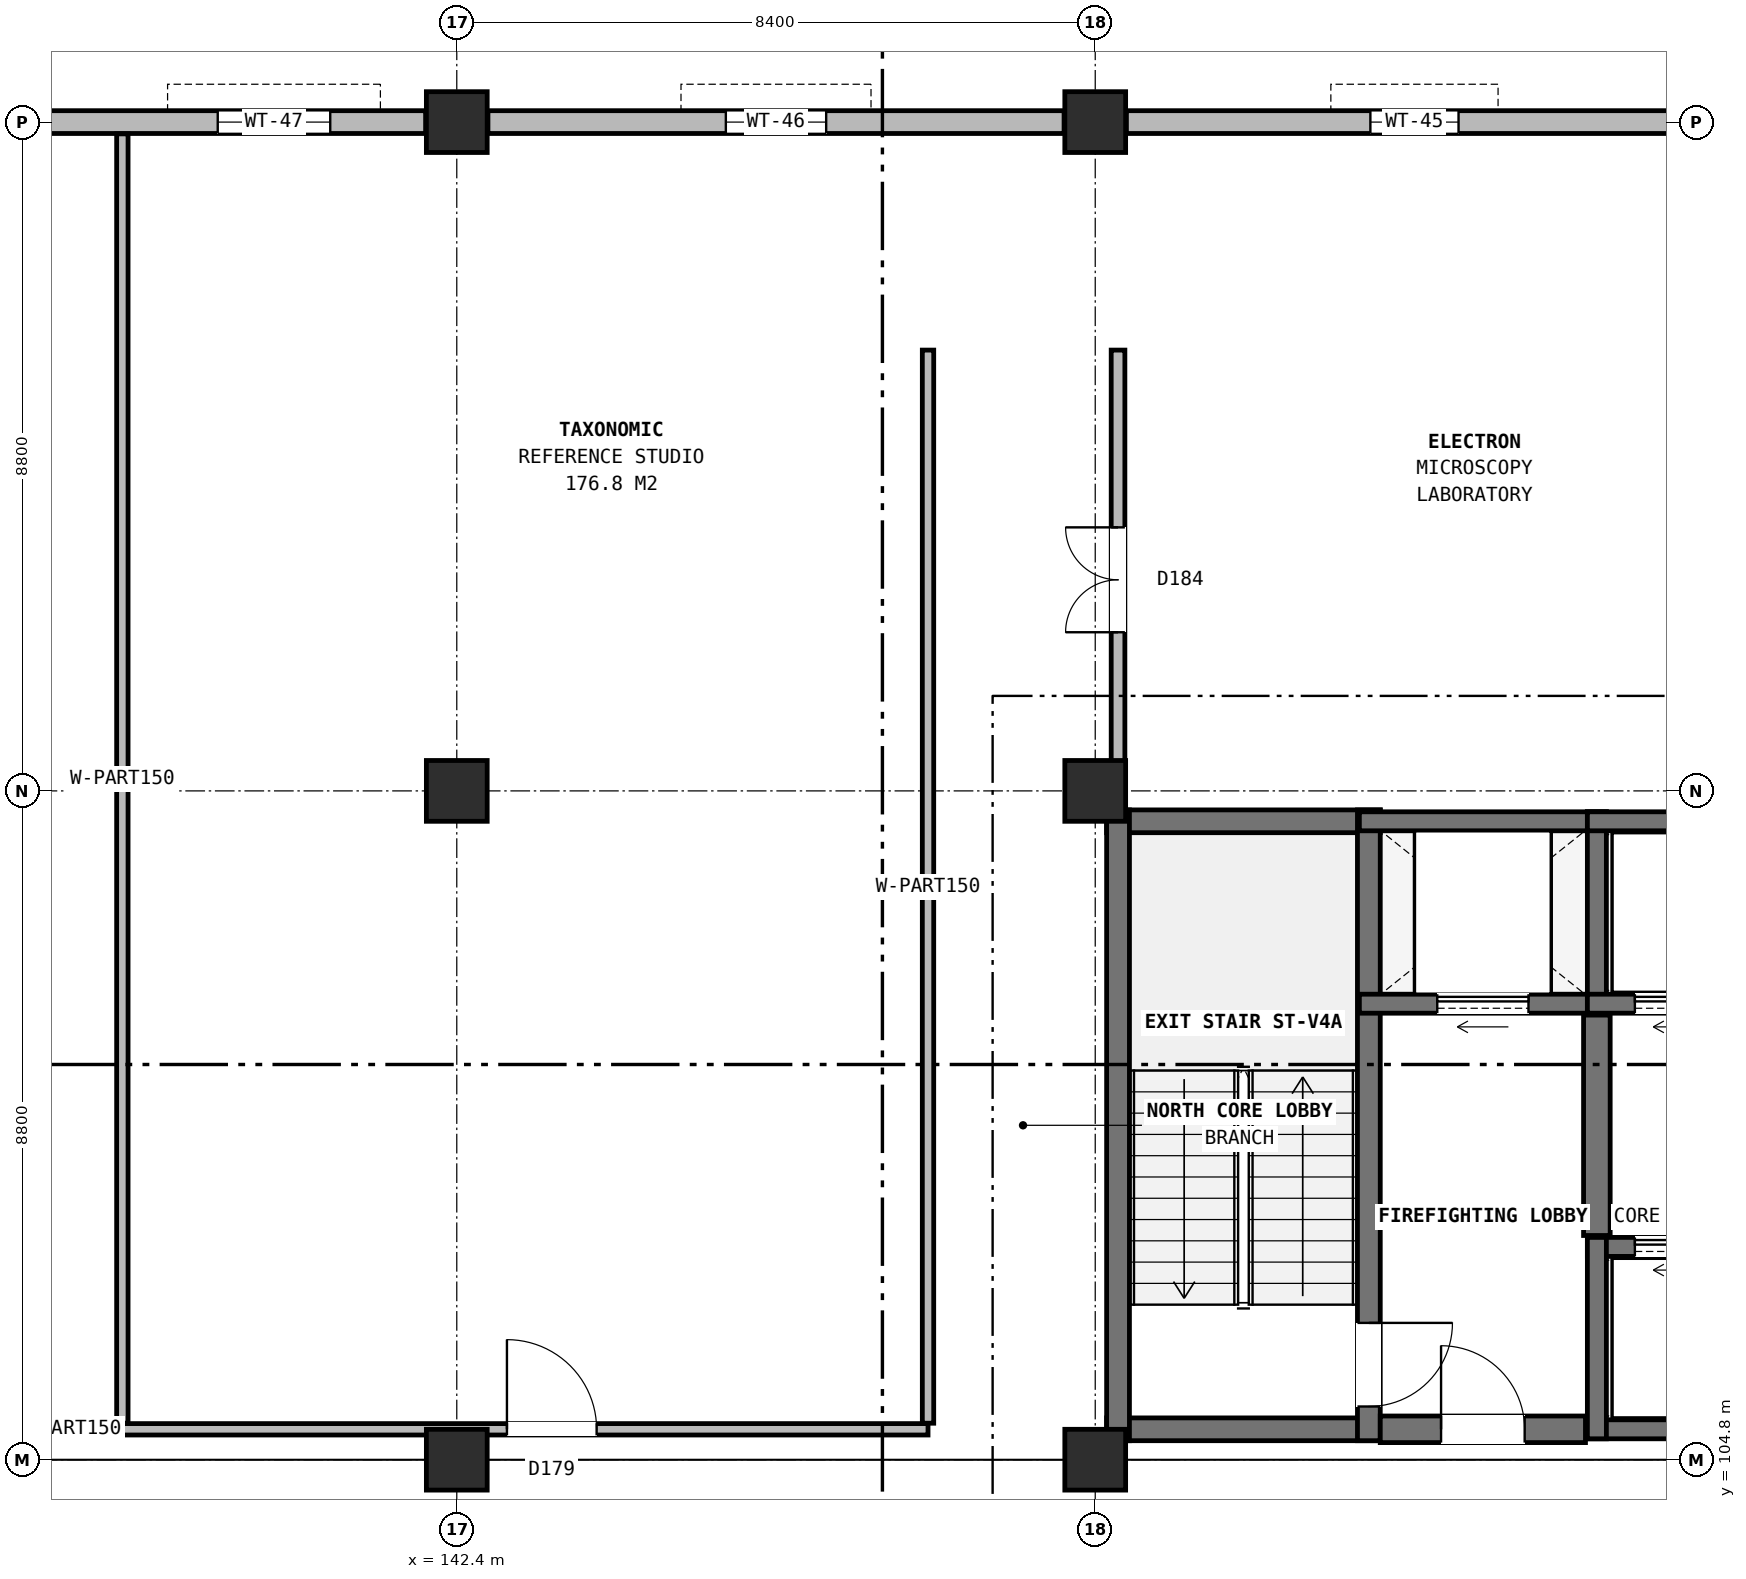
"""IFC4 building model, lengths in metres.
Left out: names, types, materials, properties, quantities, classifications, styles, units other than length and angle.
Written with IfcOpenShell. Run it as: python <this file> out.ifc"""

import sys

from ifc_helpers import new_model, si_unit, direction, frame, frame_2d, origin, origin_2d, place, context, subcontext, project, spatial, rectangle, extrude, element, fill, save


model = new_model("IFC4")
c1 = context("Model", 3, precision=1e-05, world=origin(), true_north=direction((0.0, 1.0)))
c2 = subcontext(c1, "Body", "Model", "MODEL_VIEW")
j1 = project(units=[si_unit("LENGTHUNIT", "METRE"), si_unit("PLANEANGLEUNIT", "RADIAN")], contexts=[c1])
p1 = place(None, origin())
s1 = spatial("IfcSite", under=j1, at=p1, CompositionType="ELEMENT")
p2 = place(p1, origin())
s2 = spatial("IfcBuilding", under=s1, at=p2, CompositionType="ELEMENT")
p3 = place(p2, frame((0.0, 0.0, 9.0)))
s3 = spatial("IfcBuildingStorey", under=s2, at=p3, CompositionType="ELEMENT", Elevation=9.0)
for number, where, z_axis, x_axis in (
    (1, (142.4, 104.8, 0.0), (0.0, 0.0, 1.0), (1.0, 0.0, 0.0)),
    (2, (142.4, 113.6, 0.0), (0.0, 0.0, 1.0), (1.0, 0.0, 0.0)),
    (3, (142.4, 122.4, 0.0), (0.0, 0.0, 1.0), (1.0, 0.0, 0.0)),
    (4, (150.8, 104.8, 0.0), (0.0, 0.0, 1.0), (1.0, 0.0, 0.0)),
    (5, (150.8, 113.6, 0.0), (0.0, 0.0, 1.0), (1.0, 0.0, 0.0)),
    (6, (150.8, 122.4, 0.0), (0.0, 0.0, 1.0), (1.0, 0.0, 0.0)),
):
    element("IfcColumn", number, at=place(p3, frame(where, z_axis=z_axis, x_axis=x_axis)), inside=s3, PredefinedType="COLUMN", context=c2, shape_type="SweptSolid", body=[
        extrude(rectangle(XDim=0.8, YDim=0.8, at=origin_2d()), origin(), (0.0, 0.0, 1.0), 4.2),
    ])
p4 = place(p3, frame((158.79, 122.4, 0.0), z_axis=(0.0, 0.0, 1.0), x_axis=(-1.0, 0.0, 0.0)))
e7 = element("IfcWall", 7, at=p4, inside=s3, PredefinedType="SOLIDWALL", context=c2, shape_type="SweptSolid", body=[
    extrude(rectangle(XDim=7.58, YDim=0.3, at=frame_2d((3.79, 0.0))), origin(), (0.0, 0.0, 1.0), 3.45),
])
p5 = place(p4, frame((3.21, 0.0, 0.9)))
e8 = element("IfcOpeningElement", 8, at=p5, cuts=e7, PredefinedType="OPENING", context=c2, shape_type="SweptSolid", body=[
    extrude(rectangle(XDim=1.16, YDim=1.74, at=frame_2d((0.58, 0.87))), frame((0.0, 0.16, 0.0), z_axis=(0.0, -1.0, 0.0), x_axis=(1.0, 0.0, 0.0)), (0.0, 0.0, 1.0), 0.32),
])
p6 = place(p3, frame((150.39, 122.4, 0.0), z_axis=(0.0, 0.0, 1.0), x_axis=(-1.0, 0.0, 0.0)))
e9 = element("IfcWall", 9, at=p6, inside=s3, PredefinedType="SOLIDWALL", context=c2, shape_type="SweptSolid", body=[
    extrude(rectangle(XDim=7.58, YDim=0.3, at=frame_2d((3.79, 0.0))), origin(), (0.0, 0.0, 1.0), 3.45),
])
p7 = place(p6, frame((3.13, 0.0, 0.9)))
e10 = element("IfcOpeningElement", 10, at=p7, cuts=e9, PredefinedType="OPENING", context=c2, shape_type="SweptSolid", body=[
    extrude(rectangle(XDim=1.32, YDim=1.78, at=frame_2d((0.66, 0.89))), frame((0.0, 0.16, 0.0), z_axis=(0.0, -1.0, 0.0), x_axis=(1.0, 0.0, 0.0)), (0.0, 0.0, 1.0), 0.32),
])
p8 = place(p3, frame((141.99, 122.4, 0.0), z_axis=(0.0, 0.0, 1.0), x_axis=(-1.0, 0.0, 0.0)))
e11 = element("IfcWall", 11, at=p8, inside=s3, PredefinedType="SOLIDWALL", context=c2, shape_type="SweptSolid", body=[
    extrude(rectangle(XDim=7.58, YDim=0.3, at=frame_2d((3.79, 0.0))), origin(), (0.0, 0.0, 1.0), 3.45),
])
p9 = place(p8, frame((1.255, 0.0, 0.9)))
e12 = element("IfcOpeningElement", 12, at=p9, cuts=e11, PredefinedType="OPENING", context=c2, shape_type="SweptSolid", body=[
    extrude(rectangle(XDim=1.48, YDim=1.84, at=frame_2d((0.74, 0.92))), frame((0.0, 0.16, 0.0), z_axis=(0.0, -1.0, 0.0), x_axis=(1.0, 0.0, 0.0)), (0.0, 0.0, 1.0), 0.32),
])
for number, where, z_axis, x_axis in (
    (13, (150.95, 105.2, 0.0), (0.0, 0.0, 1.0), (1.0, 0.0, 0.0)),
    (14, (150.95, 113.2, 0.0), (0.0, 0.0, 1.0), (1.0, 0.0, 0.0)),
):
    element("IfcWall", number, at=place(p3, frame(where, z_axis=z_axis, x_axis=x_axis)), inside=s3, PredefinedType="SHEAR", context=c2, shape_type="SweptSolid", body=[
        extrude(rectangle(XDim=3.6, YDim=0.3, at=frame_2d((1.8, 0.0))), origin(), (0.0, 0.0, 1.0), 4.2),
    ])
p10 = place(p3, frame((151.1, 105.05, 0.0), z_axis=(0.0, 0.0, 1.0), x_axis=(0.0, 1.0, 0.0)))
e15 = element("IfcWall", 15, at=p10, inside=s3, PredefinedType="SHEAR", context=c2, shape_type="SweptSolid", body=[
    extrude(rectangle(XDim=8.3, YDim=0.3, at=frame_2d((4.15, 0.0))), origin(), (0.0, 0.0, 1.0), 4.2),
])
p11 = place(p3, frame((154.4, 105.05, 0.0), z_axis=(0.0, 0.0, 1.0), x_axis=(0.0, 1.0, 0.0)))
e16 = element("IfcWall", 16, at=p11, inside=s3, PredefinedType="SHEAR", context=c2, shape_type="SweptSolid", body=[
    extrude(rectangle(XDim=8.3, YDim=0.3, at=frame_2d((4.15, 0.0))), origin(), (0.0, 0.0, 1.0), 4.2),
])
p12 = place(p11, frame((0.45, 0.0, 0.0)))
e17 = element("IfcOpeningElement", 17, at=p12, cuts=e16, PredefinedType="OPENING", context=c2, shape_type="SweptSolid", body=[
    extrude(rectangle(XDim=1.1, YDim=2.2, at=frame_2d((0.55, 1.1))), frame((0.0, 0.16, 0.0), z_axis=(0.0, -1.0, 0.0), x_axis=(1.0, 0.0, 0.0)), (0.0, 0.0, 1.0), 0.32),
])
p13 = place(p3, frame((154.275, 110.8, 0.0), z_axis=(0.0, 0.0, 1.0), x_axis=(1.0, 0.0, 0.0)))
e18 = element("IfcWall", 18, at=p13, inside=s3, PredefinedType="SOLIDWALL", context=c2, shape_type="SweptSolid", body=[
    extrude(rectangle(XDim=3.25, YDim=0.25, at=frame_2d((1.625, 0.0))), origin(), (0.0, 0.0, 1.0), 3.88),
])
p14 = place(p13, frame((1.025, 0.0, 0.0)))
e19 = element("IfcOpeningElement", 19, at=p14, cuts=e18, PredefinedType="OPENING", context=c2, shape_type="SweptSolid", body=[
    extrude(rectangle(XDim=1.2, YDim=2.2, at=frame_2d((0.6, 1.1))), frame((0.0, 0.135, 0.0), z_axis=(0.0, -1.0, 0.0), x_axis=(1.0, 0.0, 0.0)), (0.0, 0.0, 1.0), 0.27),
])
p15 = place(p3, frame((154.275, 113.2, 0.0), z_axis=(0.0, 0.0, 1.0), x_axis=(1.0, 0.0, 0.0)))
e20 = element("IfcWall", 20, at=p15, inside=s3, PredefinedType="SOLIDWALL", context=c2, shape_type="SweptSolid", body=[
    extrude(rectangle(XDim=3.25, YDim=0.25, at=frame_2d((1.625, 0.0))), origin(), (0.0, 0.0, 1.0), 3.88),
])
p16 = place(p3, frame((157.4, 110.675, 0.0), z_axis=(0.0, 0.0, 1.0), x_axis=(0.0, 1.0, 0.0)))
e21 = element("IfcWall", 21, at=p16, inside=s3, PredefinedType="SOLIDWALL", context=c2, shape_type="SweptSolid", body=[
    extrude(rectangle(XDim=2.65, YDim=0.25, at=frame_2d((1.325, 0.0))), origin(), (0.0, 0.0, 1.0), 3.88),
])
p17 = place(p3, frame((157.275, 110.8, 0.0), z_axis=(0.0, 0.0, 1.0), x_axis=(1.0, 0.0, 0.0)))
e22 = element("IfcWall", 22, at=p17, inside=s3, PredefinedType="SOLIDWALL", context=c2, shape_type="SweptSolid", body=[
    extrude(rectangle(XDim=2.35, YDim=0.25, at=frame_2d((1.175, 0.0))), origin(), (0.0, 0.0, 1.0), 3.88),
])
p18 = place(p17, frame((0.625, 0.0, 0.0)))
e23 = element("IfcOpeningElement", 23, at=p18, cuts=e22, PredefinedType="OPENING", context=c2, shape_type="SweptSolid", body=[
    extrude(rectangle(XDim=1.1, YDim=2.2, at=frame_2d((0.55, 1.1))), frame((0.0, 0.135, 0.0), z_axis=(0.0, -1.0, 0.0), x_axis=(1.0, 0.0, 0.0)), (0.0, 0.0, 1.0), 0.27),
])
for number, where, z_axis, x_axis in (
    (24, (157.275, 113.2, 0.0), (0.0, 0.0, 1.0), (1.0, 0.0, 0.0)),
    (25, (157.275, 105.2, 0.0), (0.0, 0.0, 1.0), (1.0, 0.0, 0.0)),
):
    element("IfcWall", number, at=place(p3, frame(where, z_axis=z_axis, x_axis=x_axis)), inside=s3, PredefinedType="SOLIDWALL", context=c2, shape_type="SweptSolid", body=[
        extrude(rectangle(XDim=2.35, YDim=0.25, at=frame_2d((1.175, 0.0))), origin(), (0.0, 0.0, 1.0), 3.88),
    ])
p19 = place(p3, frame((157.275, 107.6, 0.0), z_axis=(0.0, 0.0, 1.0), x_axis=(1.0, 0.0, 0.0)))
e26 = element("IfcWall", 26, at=p19, inside=s3, PredefinedType="SOLIDWALL", context=c2, shape_type="SweptSolid", body=[
    extrude(rectangle(XDim=2.35, YDim=0.25, at=frame_2d((1.175, 0.0))), origin(), (0.0, 0.0, 1.0), 3.88),
])
p20 = place(p19, frame((0.625, 0.0, 0.0)))
e27 = element("IfcOpeningElement", 27, at=p20, cuts=e26, PredefinedType="OPENING", context=c2, shape_type="SweptSolid", body=[
    extrude(rectangle(XDim=1.1, YDim=2.2, at=frame_2d((0.55, 1.1))), frame((0.0, 0.135, 0.0), z_axis=(0.0, -1.0, 0.0), x_axis=(1.0, 0.0, 0.0)), (0.0, 0.0, 1.0), 0.27),
])
p21 = place(p3, frame((157.4, 105.075, 0.0), z_axis=(0.0, 0.0, 1.0), x_axis=(0.0, 1.0, 0.0)))
e28 = element("IfcWall", 28, at=p21, inside=s3, PredefinedType="SOLIDWALL", context=c2, shape_type="SweptSolid", body=[
    extrude(rectangle(XDim=2.65, YDim=0.25, at=frame_2d((1.325, 0.0))), origin(), (0.0, 0.0, 1.0), 3.88),
])
p22 = place(p3, frame((157.4, 107.75, 0.0), z_axis=(0.0, 0.0, 1.0), x_axis=(0.0, 1.0, 0.0)))
e29 = element("IfcWall", 29, at=p22, inside=s3, PredefinedType="SHEAR", context=c2, shape_type="SweptSolid", body=[
    extrude(rectangle(XDim=2.9, YDim=0.35, at=frame_2d((1.45, 0.0))), origin(), (0.0, 0.0, 1.0), 3.88),
])
p23 = place(p3, frame((154.55, 105.2, 0.0), z_axis=(0.0, 0.0, 1.0), x_axis=(1.0, 0.0, 0.0)))
e30 = element("IfcWall", 30, at=p23, inside=s3, PredefinedType="SHEAR", context=c2, shape_type="SweptSolid", body=[
    extrude(rectangle(XDim=2.7, YDim=0.35, at=frame_2d((1.35, 0.0))), origin(), (0.0, 0.0, 1.0), 3.88),
])
p24 = place(p23, frame((0.8, 0.0, 0.0)))
e31 = element("IfcOpeningElement", 31, at=p24, cuts=e30, PredefinedType="OPENING", context=c2, shape_type="SweptSolid", body=[
    extrude(rectangle(XDim=1.1, YDim=2.2, at=frame_2d((0.55, 1.1))), frame((0.0, 0.185, 0.0), z_axis=(0.0, -1.0, 0.0), x_axis=(1.0, 0.0, 0.0)), (0.0, 0.0, 1.0), 0.37),
])
p25 = place(p3, frame((126.0, 105.2, 0.0), z_axis=(0.0, 0.0, 1.0), x_axis=(1.0, 0.0, 0.0)))
e32 = element("IfcWall", 32, at=p25, inside=s3, PredefinedType="PARTITIONING", context=c2, shape_type="SweptSolid", body=[
    extrude(rectangle(XDim=12.0, YDim=0.15, at=frame_2d((6.0, 0.0))), origin(), (0.0, 0.0, 1.0), 3.245),
])
p26 = place(p25, frame((5.44, 0.0, 0.0)))
e33 = element("IfcOpeningElement", 33, at=p26, cuts=e32, PredefinedType="OPENING", context=c2, shape_type="SweptSolid", body=[
    extrude(rectangle(XDim=1.12, YDim=2.22, at=frame_2d((0.56, 1.11))), frame((0.0, 0.085, 0.0), z_axis=(0.0, -1.0, 0.0), x_axis=(1.0, 0.0, 0.0)), (0.0, 0.0, 1.0), 0.17),
])
p27 = place(p3, frame((138.0, 105.2, 0.0), z_axis=(0.0, 0.0, 1.0), x_axis=(1.0, 0.0, 0.0)))
e34 = element("IfcWall", 34, at=p27, inside=s3, PredefinedType="PARTITIONING", context=c2, shape_type="SweptSolid", body=[
    extrude(rectangle(XDim=10.6, YDim=0.15, at=frame_2d((5.3, 0.0))), origin(), (0.0, 0.0, 1.0), 3.245),
])
p28 = place(p27, frame((5.06, 0.0, 0.0)))
e35 = element("IfcOpeningElement", 35, at=p28, cuts=e34, PredefinedType="OPENING", context=c2, shape_type="SweptSolid", body=[
    extrude(rectangle(XDim=1.18, YDim=2.24, at=frame_2d((0.59, 1.12))), frame((0.0, 0.085, 0.0), z_axis=(0.0, -1.0, 0.0), x_axis=(1.0, 0.0, 0.0)), (0.0, 0.0, 1.0), 0.17),
])
p29 = place(p3, frame((148.6, 105.28, 0.0), z_axis=(0.0, 0.0, 1.0), x_axis=(0.0, 1.0, 0.0)))
e36 = element("IfcWall", 36, at=p29, inside=s3, PredefinedType="PARTITIONING", context=c2, shape_type="SweptSolid", body=[
    extrude(rectangle(XDim=14.12, YDim=0.15, at=frame_2d((7.06, 0.0))), origin(), (0.0, 0.0, 1.0), 3.865),
])
p30 = place(p3, frame((151.1, 113.355, 0.0), z_axis=(0.0, 0.0, 1.0), x_axis=(0.0, 1.0, 0.0)))
e37 = element("IfcWall", 37, at=p30, inside=s3, PredefinedType="PARTITIONING", context=c2, shape_type="SweptSolid", body=[
    extrude(rectangle(XDim=6.045, YDim=0.18, at=frame_2d((3.022, 0.0))), origin(), (0.0, 0.0, 1.0), 3.245),
])
p31 = place(p30, frame((2.333, 0.0, 0.0)))
e38 = element("IfcOpeningElement", 38, at=p31, cuts=e37, PredefinedType="OPENING", context=c2, shape_type="SweptSolid", body=[
    extrude(rectangle(XDim=1.38, YDim=2.2, at=frame_2d((0.69, 1.1))), frame((0.0, 0.1, 0.0), z_axis=(0.0, -1.0, 0.0), x_axis=(1.0, 0.0, 0.0)), (0.0, 0.0, 1.0), 0.2),
])
p32 = place(p3, frame((138.0, 105.28, 0.0), z_axis=(0.0, 0.0, 1.0), x_axis=(0.0, 1.0, 0.0)))
e39 = element("IfcWall", 39, at=p32, inside=s3, PredefinedType="PARTITIONING", context=c2, shape_type="SweptSolid", body=[
    extrude(rectangle(XDim=16.965, YDim=0.15, at=frame_2d((8.482, 0.0))), origin(), (0.0, 0.0, 1.0), 3.865),
])
p33 = place(p5, origin())
e40 = element("IfcWindow", 40, at=p33, inside=s3, PartitioningType="SINGLE_PANEL", PredefinedType="WINDOW", context=c2, shape_type="SweptSolid", body=[
    extrude(rectangle(XDim=1.16, YDim=1.74, at=frame_2d((0.58, 0.87))), frame((0.0, 0.03, 0.0), z_axis=(0.0, -1.0, 0.0), x_axis=(1.0, 0.0, 0.0)), (0.0, 0.0, 1.0), 0.06),
])
fill(e8, e40)
p34 = place(p7, origin())
e41 = element("IfcWindow", 41, at=p34, inside=s3, PartitioningType="SINGLE_PANEL", PredefinedType="WINDOW", context=c2, shape_type="SweptSolid", body=[
    extrude(rectangle(XDim=1.32, YDim=1.78, at=frame_2d((0.66, 0.89))), frame((0.0, 0.03, 0.0), z_axis=(0.0, -1.0, 0.0), x_axis=(1.0, 0.0, 0.0)), (0.0, 0.0, 1.0), 0.06),
])
fill(e10, e41)
p35 = place(p9, origin())
e42 = element("IfcWindow", 42, at=p35, inside=s3, PartitioningType="SINGLE_PANEL", PredefinedType="WINDOW", context=c2, shape_type="SweptSolid", body=[
    extrude(rectangle(XDim=1.48, YDim=1.84, at=frame_2d((0.74, 0.92))), frame((0.0, 0.03, 0.0), z_axis=(0.0, -1.0, 0.0), x_axis=(1.0, 0.0, 0.0)), (0.0, 0.0, 1.0), 0.06),
])
fill(e12, e42)
p36 = place(p12, frame((1.1, 0.0, 0.0), z_axis=(0.0, 0.0, 1.0), x_axis=(-1.0, 0.0, 0.0)))
e43 = element("IfcDoor", 43, at=p36, inside=s3, OperationType="SINGLE_SWING_RIGHT", PredefinedType="DOOR", context=c2, shape_type="SweptSolid", body=[
    extrude(rectangle(XDim=1.1, YDim=2.2, at=frame_2d((0.55, 1.1))), frame((0.0, 0.025, 0.0), z_axis=(0.0, -1.0, 0.0), x_axis=(1.0, 0.0, 0.0)), (0.0, 0.0, 1.0), 0.05),
])
fill(e17, e43)
p37 = place(p14, origin())
e44 = element("IfcDoor", 44, at=p37, inside=s3, OperationType="SLIDING_TO_LEFT", PredefinedType="DOOR", context=c2, shape_type="SweptSolid", body=[
    extrude(rectangle(XDim=1.2, YDim=2.2, at=frame_2d((0.6, 1.1))), frame((0.0, 0.025, 0.0), z_axis=(0.0, -1.0, 0.0), x_axis=(1.0, 0.0, 0.0)), (0.0, 0.0, 1.0), 0.05),
])
fill(e19, e44)
p38 = place(p18, origin())
e45 = element("IfcDoor", 45, at=p38, inside=s3, OperationType="SLIDING_TO_LEFT", PredefinedType="DOOR", context=c2, shape_type="SweptSolid", body=[
    extrude(rectangle(XDim=1.1, YDim=2.2, at=frame_2d((0.55, 1.1))), frame((0.0, 0.025, 0.0), z_axis=(0.0, -1.0, 0.0), x_axis=(1.0, 0.0, 0.0)), (0.0, 0.0, 1.0), 0.05),
])
fill(e23, e45)
p39 = place(p20, origin())
e46 = element("IfcDoor", 46, at=p39, inside=s3, OperationType="SLIDING_TO_LEFT", PredefinedType="DOOR", context=c2, shape_type="SweptSolid", body=[
    extrude(rectangle(XDim=1.1, YDim=2.2, at=frame_2d((0.55, 1.1))), frame((0.0, 0.025, 0.0), z_axis=(0.0, -1.0, 0.0), x_axis=(1.0, 0.0, 0.0)), (0.0, 0.0, 1.0), 0.05),
])
fill(e27, e46)
p40 = place(p24, origin())
e47 = element("IfcDoor", 47, at=p40, inside=s3, OperationType="SINGLE_SWING_LEFT", PredefinedType="DOOR", context=c2, shape_type="SweptSolid", body=[
    extrude(rectangle(XDim=1.1, YDim=2.2, at=frame_2d((0.55, 1.1))), frame((0.0, 0.025, 0.0), z_axis=(0.0, -1.0, 0.0), x_axis=(1.0, 0.0, 0.0)), (0.0, 0.0, 1.0), 0.05),
])
fill(e31, e47)
p41 = place(p28, origin())
e48 = element("IfcDoor", 48, at=p41, inside=s3, OperationType="SINGLE_SWING_LEFT", PredefinedType="DOOR", context=c2, shape_type="SweptSolid", body=[
    extrude(rectangle(XDim=1.18, YDim=2.24, at=frame_2d((0.59, 1.12))), frame((0.0, 0.025, 0.0), z_axis=(0.0, -1.0, 0.0), x_axis=(1.0, 0.0, 0.0)), (0.0, 0.0, 1.0), 0.05),
])
fill(e35, e48)
p42 = place(p31, origin())
e49 = element("IfcDoor", 49, at=p42, inside=s3, OperationType="DOUBLE_DOOR_SINGLE_SWING", PredefinedType="DOOR", context=c2, shape_type="SweptSolid", body=[
    extrude(rectangle(XDim=1.38, YDim=2.2, at=frame_2d((0.69, 1.1))), frame((0.0, 0.025, 0.0), z_axis=(0.0, -1.0, 0.0), x_axis=(1.0, 0.0, 0.0)), (0.0, 0.0, 1.0), 0.05),
])
fill(e38, e49)
save(model, sys.argv[1])
